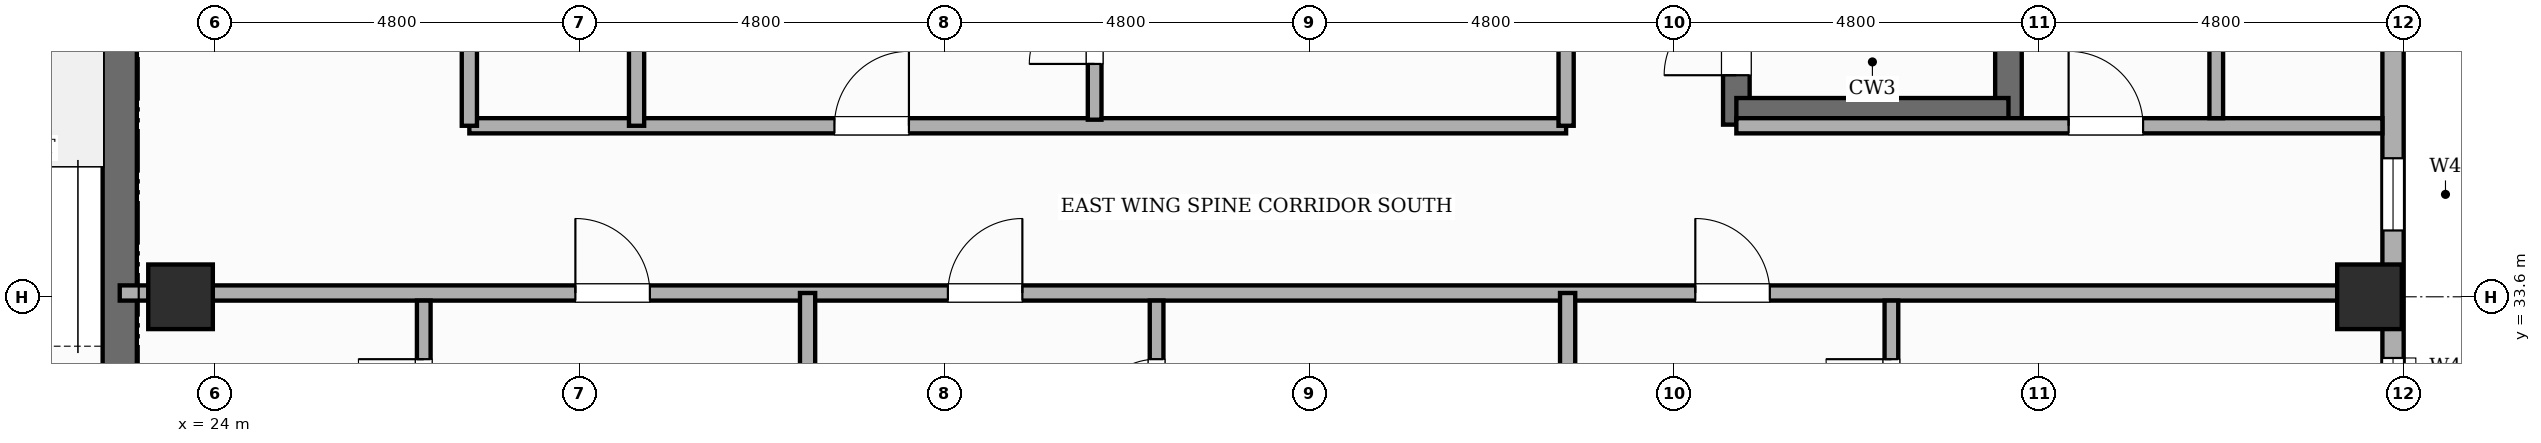
"""IFC4 building model, lengths in metres.
Left out: names, types, materials, properties, quantities, classifications, styles, units other than length and angle.
Written with IfcOpenShell. Run it as: python <this file> out.ifc"""

import sys

from ifc_helpers import new_model, si_unit, direction, frame, frame_2d, origin, origin_2d, place, context, subcontext, project, spatial, rectangle, extrude, element, fill, save


model = new_model("IFC4")
c1 = context("Model", 3, precision=1e-05, world=origin(), true_north=direction((0.0, 1.0)))
c2 = subcontext(c1, "Body", "Model", "MODEL_VIEW")
j1 = project(units=[si_unit("LENGTHUNIT", "METRE"), si_unit("PLANEANGLEUNIT", "RADIAN")], contexts=[c1])
p1 = place(None, origin())
s1 = spatial("IfcSite", under=j1, at=p1, CompositionType="ELEMENT")
p2 = place(p1, origin())
s2 = spatial("IfcBuilding", under=s1, at=p2, CompositionType="ELEMENT")
p3 = place(p2, frame((0.0, 0.0, 211.0)))
s3 = spatial("IfcBuildingStorey", under=s2, at=p3, CompositionType="ELEMENT", Elevation=211.0)
p4 = place(p3, frame((22.75, 30.675, 0.0), z_axis=(0.0, 0.0, 1.0), x_axis=(0.0, 1.0, 0.0)))
e1 = element("IfcWall", 1, at=p4, inside=s3, PredefinedType="SHEAR", context=c2, shape_type="SweptSolid", body=[
    extrude(rectangle(XDim=15.35, YDim=0.45, at=frame_2d((7.675, 0.0))), origin(), (0.0, 0.0, 1.0), 3.6),
])
p5 = place(p4, frame((10.675, 0.0, 0.0)))
e2 = element("IfcOpeningElement", 2, at=p5, cuts=e1, PredefinedType="OPENING", context=c2, shape_type="SweptSolid", body=[
    extrude(rectangle(XDim=1.0, YDim=2.15, at=frame_2d((0.5, 1.075))), frame((0.0, 0.235, 0.0), z_axis=(0.0, -1.0, 0.0), x_axis=(1.0, 0.0, 0.0)), (0.0, 0.0, 1.0), 0.47),
])
p6 = place(p3, frame((44.02, 35.865, 0.0), z_axis=(0.0, 0.0, 1.0), x_axis=(0.0, 1.0, 0.0)))
e3 = element("IfcWall", 3, at=p6, inside=s3, PredefinedType="SHEAR", context=c2, shape_type="SweptSolid", body=[
    extrude(rectangle(XDim=8.97, YDim=0.35, at=frame_2d((4.485, 0.0))), origin(), (0.0, 0.0, 1.0), 3.6),
])
p7 = place(p6, frame((0.65, 0.0, 0.0)))
e4 = element("IfcOpeningElement", 4, at=p7, cuts=e3, PredefinedType="OPENING", context=c2, shape_type="SweptSolid", body=[
    extrude(rectangle(XDim=0.95, YDim=2.1, at=frame_2d((0.475, 1.05))), frame((0.0, 0.185, 0.0), z_axis=(0.0, -1.0, 0.0), x_axis=(1.0, 0.0, 0.0)), (0.0, 0.0, 1.0), 0.37),
])
p8 = place(p3, frame((47.6, 35.865, 0.0), z_axis=(0.0, 0.0, 1.0), x_axis=(0.0, 1.0, 0.0)))
e5 = element("IfcWall", 5, at=p8, inside=s3, PredefinedType="SHEAR", context=c2, shape_type="SweptSolid", body=[
    extrude(rectangle(XDim=8.97, YDim=0.35, at=frame_2d((4.485, 0.0))), origin(), (0.0, 0.0, 1.0), 3.6),
])
p9 = place(p3, frame((44.02, 36.04, 0.0), z_axis=(0.0, 0.0, 1.0), x_axis=(1.0, 0.0, 0.0)))
e6 = element("IfcWall", 6, at=p9, inside=s3, PredefinedType="SHEAR", context=c2, shape_type="SweptSolid", body=[
    extrude(rectangle(XDim=3.58, YDim=0.35, at=frame_2d((1.79, 0.0))), origin(), (0.0, 0.0, 1.0), 3.6),
])
for number, where, z_axis, x_axis in (
    (7, (23.55, 33.6, 0.0), (0.0, 0.0, 1.0), (1.0, 0.0, 0.0)),
    (8, (52.35, 33.6, 0.0), (0.0, 0.0, 1.0), (1.0, 0.0, 0.0)),
):
    element("IfcColumn", number, at=place(p3, frame(where, z_axis=z_axis, x_axis=x_axis)), inside=s3, PredefinedType="COLUMN", context=c2, shape_type="SweptSolid", body=[
        extrude(rectangle(XDim=0.85, YDim=0.85, at=origin_2d()), origin(), (0.0, 0.0, 1.0), 3.6),
    ])
p10 = place(p3, frame((52.66, 45.6, 0.0), z_axis=(0.0, 0.0, 1.0), x_axis=(0.0, -1.0, 0.0)))
e9 = element("IfcWall", 9, at=p10, inside=s3, PredefinedType="STANDARD", context=c2, shape_type="SweptSolid", body=[
    extrude(rectangle(XDim=14.4, YDim=0.28, at=frame_2d((7.2, 0.0))), origin(), (0.0, 0.0, 1.0), 2.66),
])
p11 = place(p10, frame((4.25, 0.0, 0.0)))
e10 = element("IfcOpeningElement", 10, at=p11, cuts=e9, PredefinedType="OPENING", context=c2, shape_type="SweptSolid", body=[
    extrude(rectangle(XDim=1.1, YDim=2.15, at=frame_2d((0.55, 1.075))), frame((0.0, 0.15, 0.0), z_axis=(0.0, -1.0, 0.0), x_axis=(1.0, 0.0, 0.0)), (0.0, 0.0, 1.0), 0.3),
])
p12 = place(p10, frame((10.177, 0.0, 0.45)))
e11 = element("IfcOpeningElement", 11, at=p12, cuts=e9, PredefinedType="OPENING", context=c2, shape_type="SweptSolid", body=[
    extrude(rectangle(XDim=0.95, YDim=1.8, at=frame_2d((0.475, 0.9))), frame((0.0, 0.15, 0.0), z_axis=(0.0, -1.0, 0.0), x_axis=(1.0, 0.0, 0.0)), (0.0, 0.0, 1.0), 0.3),
])
p13 = place(p10, frame((12.805, 0.0, 0.45)))
e12 = element("IfcOpeningElement", 12, at=p13, cuts=e9, PredefinedType="OPENING", context=c2, shape_type="SweptSolid", body=[
    extrude(rectangle(XDim=0.95, YDim=1.8, at=frame_2d((0.475, 0.9))), frame((0.0, 0.15, 0.0), z_axis=(0.0, -1.0, 0.0), x_axis=(1.0, 0.0, 0.0)), (0.0, 0.0, 1.0), 0.3),
])
p14 = place(p10, frame((0.308, 0.0, 0.65)))
e13 = element("IfcOpeningElement", 13, at=p14, cuts=e9, PredefinedType="OPENING", context=c2, shape_type="SweptSolid", body=[
    extrude(rectangle(XDim=1.4, YDim=1.1, at=frame_2d((0.7, 0.55))), frame((0.0, 0.15, 0.0), z_axis=(0.0, -1.0, 0.0), x_axis=(1.0, 0.0, 0.0)), (0.0, 0.0, 1.0), 0.3),
])
p15 = place(p10, frame((3.299, 0.0, 0.45)))
e14 = element("IfcOpeningElement", 14, at=p15, cuts=e9, PredefinedType="OPENING", context=c2, shape_type="SweptSolid", body=[
    extrude(rectangle(XDim=0.6, YDim=1.8, at=frame_2d((0.3, 0.9))), frame((0.0, 0.15, 0.0), z_axis=(0.0, -1.0, 0.0), x_axis=(1.0, 0.0, 0.0)), (0.0, 0.0, 1.0), 0.3),
])
p16 = place(p3, frame((22.75, 33.65, 0.0), z_axis=(0.0, 0.0, 1.0), x_axis=(1.0, 0.0, 0.0)))
e15 = element("IfcWall", 15, at=p16, inside=s3, PredefinedType="PARTITIONING", context=c2, shape_type="SweptSolid", body=[
    extrude(rectangle(XDim=29.77, YDim=0.2, at=frame_2d((14.885, 0.0))), origin(), (0.0, 0.0, 1.0), 3.38),
])
p17 = place(p16, frame((5.995, 0.0, 0.0)))
e16 = element("IfcOpeningElement", 16, at=p17, cuts=e15, PredefinedType="OPENING", context=c2, shape_type="SweptSolid", body=[
    extrude(rectangle(XDim=0.98, YDim=2.18, at=frame_2d((0.49, 1.09))), frame((0.0, 0.11, 0.0), z_axis=(0.0, -1.0, 0.0), x_axis=(1.0, 0.0, 0.0)), (0.0, 0.0, 1.0), 0.22),
])
p18 = place(p16, frame((10.896, 0.0, 0.0)))
e17 = element("IfcOpeningElement", 17, at=p18, cuts=e15, PredefinedType="OPENING", context=c2, shape_type="SweptSolid", body=[
    extrude(rectangle(XDim=0.98, YDim=2.18, at=frame_2d((0.49, 1.09))), frame((0.0, 0.11, 0.0), z_axis=(0.0, -1.0, 0.0), x_axis=(1.0, 0.0, 0.0)), (0.0, 0.0, 1.0), 0.22),
])
p19 = place(p16, frame((20.73, 0.0, 0.0)))
e18 = element("IfcOpeningElement", 18, at=p19, cuts=e15, PredefinedType="OPENING", context=c2, shape_type="SweptSolid", body=[
    extrude(rectangle(XDim=0.98, YDim=2.18, at=frame_2d((0.49, 1.09))), frame((0.0, 0.11, 0.0), z_axis=(0.0, -1.0, 0.0), x_axis=(1.0, 0.0, 0.0)), (0.0, 0.0, 1.0), 0.22),
])
p20 = place(p3, frame((27.35, 35.85, 0.0), z_axis=(0.0, 0.0, 1.0), x_axis=(1.0, 0.0, 0.0)))
e19 = element("IfcWall", 19, at=p20, inside=s3, PredefinedType="PARTITIONING", context=c2, shape_type="SweptSolid", body=[
    extrude(rectangle(XDim=14.43, YDim=0.2, at=frame_2d((7.215, 0.0))), origin(), (0.0, 0.0, 1.0), 3.38),
])
p21 = place(p20, frame((4.803, 0.0, 0.0)))
e20 = element("IfcOpeningElement", 20, at=p21, cuts=e19, PredefinedType="OPENING", context=c2, shape_type="SweptSolid", body=[
    extrude(rectangle(XDim=0.98, YDim=2.18, at=frame_2d((0.49, 1.09))), frame((0.0, 0.11, 0.0), z_axis=(0.0, -1.0, 0.0), x_axis=(1.0, 0.0, 0.0)), (0.0, 0.0, 1.0), 0.22),
])
p22 = place(p3, frame((44.02, 35.85, 0.0), z_axis=(0.0, 0.0, 1.0), x_axis=(1.0, 0.0, 0.0)))
e21 = element("IfcWall", 21, at=p22, inside=s3, PredefinedType="PARTITIONING", context=c2, shape_type="SweptSolid", body=[
    extrude(rectangle(XDim=8.5, YDim=0.2, at=frame_2d((4.25, 0.0))), origin(), (0.0, 0.0, 1.0), 3.38),
])
p23 = place(p22, frame((4.372, 0.0, 0.0)))
e22 = element("IfcOpeningElement", 22, at=p23, cuts=e21, PredefinedType="OPENING", context=c2, shape_type="SweptSolid", body=[
    extrude(rectangle(XDim=0.98, YDim=2.18, at=frame_2d((0.49, 1.09))), frame((0.0, 0.11, 0.0), z_axis=(0.0, -1.0, 0.0), x_axis=(1.0, 0.0, 0.0)), (0.0, 0.0, 1.0), 0.22),
])
p24 = place(p3, frame((27.35, 35.85, 0.0), z_axis=(0.0, 0.0, 1.0), x_axis=(0.0, 1.0, 0.0)))
e23 = element("IfcWall", 23, at=p24, inside=s3, PredefinedType="PARTITIONING", context=c2, shape_type="SweptSolid", body=[
    extrude(rectangle(XDim=11.87, YDim=0.2, at=frame_2d((5.935, 0.0))), origin(), (0.0, 0.0, 1.0), 3.38),
])
p25 = place(p24, frame((1.2, 0.0, 0.0)))
e24 = element("IfcOpeningElement", 24, at=p25, cuts=e23, PredefinedType="OPENING", context=c2, shape_type="SweptSolid", body=[
    extrude(rectangle(XDim=0.95, YDim=2.15, at=frame_2d((0.475, 1.075))), frame((0.0, 0.11, 0.0), z_axis=(0.0, -1.0, 0.0), x_axis=(1.0, 0.0, 0.0)), (0.0, 0.0, 1.0), 0.22),
])
p26 = place(p3, frame((41.78, 35.85, 0.0), z_axis=(0.0, 0.0, 1.0), x_axis=(0.0, 1.0, 0.0)))
e25 = element("IfcWall", 25, at=p26, inside=s3, PredefinedType="PARTITIONING", context=c2, shape_type="SweptSolid", body=[
    extrude(rectangle(XDim=2.45, YDim=0.2, at=frame_2d((1.225, 0.0))), origin(), (0.0, 0.0, 1.0), 3.38),
])
p27 = place(p3, frame((26.75, 29.08, 0.0), z_axis=(0.0, 0.0, 1.0), x_axis=(0.0, 1.0, 0.0)))
e26 = element("IfcWall", 26, at=p27, inside=s3, PredefinedType="PLUMBINGWALL", context=c2, shape_type="SweptSolid", body=[
    extrude(rectangle(XDim=4.47, YDim=0.18, at=frame_2d((2.235, 0.0))), origin(), (0.0, 0.0, 1.0), 3.38),
])
p28 = place(p27, frame((0.499, 0.0, 0.0)))
e27 = element("IfcOpeningElement", 27, at=p28, cuts=e26, PredefinedType="OPENING", context=c2, shape_type="SweptSolid", body=[
    extrude(rectangle(XDim=0.86, YDim=2.1, at=frame_2d((0.43, 1.05))), frame((0.0, 0.1, 0.0), z_axis=(0.0, -1.0, 0.0), x_axis=(1.0, 0.0, 0.0)), (0.0, 0.0, 1.0), 0.2),
])
p29 = place(p27, frame((2.839, 0.0, 0.0)))
e28 = element("IfcOpeningElement", 28, at=p29, cuts=e26, PredefinedType="OPENING", context=c2, shape_type="SweptSolid", body=[
    extrude(rectangle(XDim=0.86, YDim=2.1, at=frame_2d((0.43, 1.05))), frame((0.0, 0.1, 0.0), z_axis=(0.0, -1.0, 0.0), x_axis=(1.0, 0.0, 0.0)), (0.0, 0.0, 1.0), 0.2),
])
p30 = place(p3, frame((31.8, 29.08, 0.0), z_axis=(0.0, 0.0, 1.0), x_axis=(0.0, 1.0, 0.0)))
e29 = element("IfcWall", 29, at=p30, inside=s3, PredefinedType="SOLIDWALL", context=c2, shape_type="SweptSolid", body=[
    extrude(rectangle(XDim=4.57, YDim=0.2, at=frame_2d((2.285, 0.0))), origin(), (0.0, 0.0, 1.0), 3.38),
])
p31 = place(p3, frame((36.392, 29.08, 0.0), z_axis=(0.0, 0.0, 1.0), x_axis=(0.0, 1.0, 0.0)))
e30 = element("IfcWall", 30, at=p31, inside=s3, PredefinedType="PLUMBINGWALL", context=c2, shape_type="SweptSolid", body=[
    extrude(rectangle(XDim=4.47, YDim=0.18, at=frame_2d((2.235, 0.0))), origin(), (0.0, 0.0, 1.0), 3.38),
])
p32 = place(p31, frame((0.499, 0.0, 0.0)))
e31 = element("IfcOpeningElement", 31, at=p32, cuts=e30, PredefinedType="OPENING", context=c2, shape_type="SweptSolid", body=[
    extrude(rectangle(XDim=0.86, YDim=2.1, at=frame_2d((0.43, 1.05))), frame((0.0, 0.1, 0.0), z_axis=(0.0, -1.0, 0.0), x_axis=(1.0, 0.0, 0.0)), (0.0, 0.0, 1.0), 0.2),
])
p33 = place(p31, frame((2.839, 0.0, 0.0)))
e32 = element("IfcOpeningElement", 32, at=p33, cuts=e30, PredefinedType="OPENING", context=c2, shape_type="SweptSolid", body=[
    extrude(rectangle(XDim=0.86, YDim=2.1, at=frame_2d((0.43, 1.05))), frame((0.0, 0.1, 0.0), z_axis=(0.0, -1.0, 0.0), x_axis=(1.0, 0.0, 0.0)), (0.0, 0.0, 1.0), 0.2),
])
p34 = place(p3, frame((41.8, 29.08, 0.0), z_axis=(0.0, 0.0, 1.0), x_axis=(0.0, 1.0, 0.0)))
e33 = element("IfcWall", 33, at=p34, inside=s3, PredefinedType="SOLIDWALL", context=c2, shape_type="SweptSolid", body=[
    extrude(rectangle(XDim=4.57, YDim=0.2, at=frame_2d((2.285, 0.0))), origin(), (0.0, 0.0, 1.0), 3.38),
])
p35 = place(p3, frame((46.06, 29.08, 0.0), z_axis=(0.0, 0.0, 1.0), x_axis=(0.0, 1.0, 0.0)))
e34 = element("IfcWall", 34, at=p35, inside=s3, PredefinedType="PLUMBINGWALL", context=c2, shape_type="SweptSolid", body=[
    extrude(rectangle(XDim=4.47, YDim=0.18, at=frame_2d((2.235, 0.0))), origin(), (0.0, 0.0, 1.0), 3.38),
])
p36 = place(p35, frame((0.499, 0.0, 0.0)))
e35 = element("IfcOpeningElement", 35, at=p36, cuts=e34, PredefinedType="OPENING", context=c2, shape_type="SweptSolid", body=[
    extrude(rectangle(XDim=0.86, YDim=2.1, at=frame_2d((0.43, 1.05))), frame((0.0, 0.1, 0.0), z_axis=(0.0, -1.0, 0.0), x_axis=(1.0, 0.0, 0.0)), (0.0, 0.0, 1.0), 0.2),
])
p37 = place(p35, frame((2.839, 0.0, 0.0)))
e36 = element("IfcOpeningElement", 36, at=p37, cuts=e34, PredefinedType="OPENING", context=c2, shape_type="SweptSolid", body=[
    extrude(rectangle(XDim=0.86, YDim=2.1, at=frame_2d((0.43, 1.05))), frame((0.0, 0.1, 0.0), z_axis=(0.0, -1.0, 0.0), x_axis=(1.0, 0.0, 0.0)), (0.0, 0.0, 1.0), 0.2),
])
p38 = place(p3, frame((29.55, 35.85, 0.0), z_axis=(0.0, 0.0, 1.0), x_axis=(0.0, 1.0, 0.0)))
e37 = element("IfcWall", 37, at=p38, inside=s3, PredefinedType="SOLIDWALL", context=c2, shape_type="SweptSolid", body=[
    extrude(rectangle(XDim=11.87, YDim=0.2, at=frame_2d((5.935, 0.0))), origin(), (0.0, 0.0, 1.0), 3.38),
])
p39 = place(p3, frame((35.577, 35.93, 0.0), z_axis=(0.0, 0.0, 1.0), x_axis=(0.0, 1.0, 0.0)))
e38 = element("IfcWall", 38, at=p39, inside=s3, PredefinedType="PLUMBINGWALL", context=c2, shape_type="SweptSolid", body=[
    extrude(rectangle(XDim=11.79, YDim=0.18, at=frame_2d((5.895, 0.0))), origin(), (0.0, 0.0, 1.0), 3.38),
])
p40 = place(p39, frame((0.733, 0.0, 0.0)))
e39 = element("IfcOpeningElement", 39, at=p40, cuts=e38, PredefinedType="OPENING", context=c2, shape_type="SweptSolid", body=[
    extrude(rectangle(XDim=0.86, YDim=2.1, at=frame_2d((0.43, 1.05))), frame((0.0, 0.1, 0.0), z_axis=(0.0, -1.0, 0.0), x_axis=(1.0, 0.0, 0.0)), (0.0, 0.0, 1.0), 0.2),
])
p41 = place(p39, frame((4.064, 0.0, 0.0)))
e40 = element("IfcOpeningElement", 40, at=p41, cuts=e38, PredefinedType="OPENING", context=c2, shape_type="SweptSolid", body=[
    extrude(rectangle(XDim=0.9, YDim=2.15, at=frame_2d((0.45, 1.075))), frame((0.0, 0.1, 0.0), z_axis=(0.0, -1.0, 0.0), x_axis=(1.0, 0.0, 0.0)), (0.0, 0.0, 1.0), 0.2),
])
p42 = place(p39, frame((8.789, 0.0, 0.0)))
e41 = element("IfcOpeningElement", 41, at=p42, cuts=e38, PredefinedType="OPENING", context=c2, shape_type="SweptSolid", body=[
    extrude(rectangle(XDim=0.9, YDim=2.15, at=frame_2d((0.45, 1.075))), frame((0.0, 0.1, 0.0), z_axis=(0.0, -1.0, 0.0), x_axis=(1.0, 0.0, 0.0)), (0.0, 0.0, 1.0), 0.2),
])
p43 = place(p3, frame((50.334, 35.95, 0.0), z_axis=(0.0, 0.0, 1.0), x_axis=(0.0, 1.0, 0.0)))
e42 = element("IfcWall", 42, at=p43, inside=s3, PredefinedType="PLUMBINGWALL", context=c2, shape_type="SweptSolid", body=[
    extrude(rectangle(XDim=11.77, YDim=0.18, at=frame_2d((5.885, 0.0))), origin(), (0.0, 0.0, 1.0), 3.38),
])
p44 = place(p43, frame((2.453, 0.0, 0.0)))
e43 = element("IfcOpeningElement", 43, at=p44, cuts=e42, PredefinedType="OPENING", context=c2, shape_type="SweptSolid", body=[
    extrude(rectangle(XDim=0.9, YDim=2.15, at=frame_2d((0.45, 1.075))), frame((0.0, 0.1, 0.0), z_axis=(0.0, -1.0, 0.0), x_axis=(1.0, 0.0, 0.0)), (0.0, 0.0, 1.0), 0.2),
])
p45 = place(p43, frame((8.487, 0.0, 0.0)))
e44 = element("IfcOpeningElement", 44, at=p45, cuts=e42, PredefinedType="OPENING", context=c2, shape_type="SweptSolid", body=[
    extrude(rectangle(XDim=0.86, YDim=2.1, at=frame_2d((0.43, 1.05))), frame((0.0, 0.1, 0.0), z_axis=(0.0, -1.0, 0.0), x_axis=(1.0, 0.0, 0.0)), (0.0, 0.0, 1.0), 0.2),
])
p46 = place(p12, origin())
e45 = element("IfcWindow", 45, at=p46, inside=s3, PartitioningType="SINGLE_PANEL", PredefinedType="WINDOW", context=c2, shape_type="SweptSolid", body=[
    extrude(rectangle(XDim=0.95, YDim=1.8, at=frame_2d((0.475, 0.9))), frame((0.0, 0.03, 0.0), z_axis=(0.0, -1.0, 0.0), x_axis=(1.0, 0.0, 0.0)), (0.0, 0.0, 1.0), 0.06),
])
fill(e11, e45)
p47 = place(p13, origin())
e46 = element("IfcWindow", 46, at=p47, inside=s3, PartitioningType="SINGLE_PANEL", PredefinedType="WINDOW", context=c2, shape_type="SweptSolid", body=[
    extrude(rectangle(XDim=0.95, YDim=1.8, at=frame_2d((0.475, 0.9))), frame((0.0, 0.03, 0.0), z_axis=(0.0, -1.0, 0.0), x_axis=(1.0, 0.0, 0.0)), (0.0, 0.0, 1.0), 0.06),
])
fill(e12, e46)
p48 = place(p7, origin())
e47 = element("IfcDoor", 47, at=p48, inside=s3, OperationType="SINGLE_SWING_LEFT", PredefinedType="DOOR", context=c2, shape_type="SweptSolid", body=[
    extrude(rectangle(XDim=0.95, YDim=2.1, at=frame_2d((0.475, 1.05))), frame((0.0, 0.025, 0.0), z_axis=(0.0, -1.0, 0.0), x_axis=(1.0, 0.0, 0.0)), (0.0, 0.0, 1.0), 0.05),
])
fill(e4, e47)
p49 = place(p17, origin())
e48 = element("IfcDoor", 48, at=p49, inside=s3, OperationType="SINGLE_SWING_LEFT", PredefinedType="DOOR", context=c2, shape_type="SweptSolid", body=[
    extrude(rectangle(XDim=0.98, YDim=2.18, at=frame_2d((0.49, 1.09))), frame((0.0, 0.025, 0.0), z_axis=(0.0, -1.0, 0.0), x_axis=(1.0, 0.0, 0.0)), (0.0, 0.0, 1.0), 0.05),
])
fill(e16, e48)
p50 = place(p29, origin())
e49 = element("IfcDoor", 49, at=p50, inside=s3, OperationType="SINGLE_SWING_RIGHT", PredefinedType="DOOR", context=c2, shape_type="SweptSolid", body=[
    extrude(rectangle(XDim=0.86, YDim=2.1, at=frame_2d((0.43, 1.05))), frame((0.0, 0.025, 0.0), z_axis=(0.0, -1.0, 0.0), x_axis=(1.0, 0.0, 0.0)), (0.0, 0.0, 1.0), 0.05),
])
fill(e28, e49)
p51 = place(p18, origin())
e50 = element("IfcDoor", 50, at=p51, inside=s3, OperationType="SINGLE_SWING_RIGHT", PredefinedType="DOOR", context=c2, shape_type="SweptSolid", body=[
    extrude(rectangle(XDim=0.98, YDim=2.18, at=frame_2d((0.49, 1.09))), frame((0.0, 0.025, 0.0), z_axis=(0.0, -1.0, 0.0), x_axis=(1.0, 0.0, 0.0)), (0.0, 0.0, 1.0), 0.05),
])
fill(e17, e50)
p52 = place(p33, origin())
e51 = element("IfcDoor", 51, at=p52, inside=s3, OperationType="SINGLE_SWING_LEFT", PredefinedType="DOOR", context=c2, shape_type="SweptSolid", body=[
    extrude(rectangle(XDim=0.86, YDim=2.1, at=frame_2d((0.43, 1.05))), frame((0.0, 0.025, 0.0), z_axis=(0.0, -1.0, 0.0), x_axis=(1.0, 0.0, 0.0)), (0.0, 0.0, 1.0), 0.05),
])
fill(e32, e51)
p53 = place(p19, origin())
e52 = element("IfcDoor", 52, at=p53, inside=s3, OperationType="SINGLE_SWING_LEFT", PredefinedType="DOOR", context=c2, shape_type="SweptSolid", body=[
    extrude(rectangle(XDim=0.98, YDim=2.18, at=frame_2d((0.49, 1.09))), frame((0.0, 0.025, 0.0), z_axis=(0.0, -1.0, 0.0), x_axis=(1.0, 0.0, 0.0)), (0.0, 0.0, 1.0), 0.05),
])
fill(e18, e52)
p54 = place(p37, origin())
e53 = element("IfcDoor", 53, at=p54, inside=s3, OperationType="SINGLE_SWING_RIGHT", PredefinedType="DOOR", context=c2, shape_type="SweptSolid", body=[
    extrude(rectangle(XDim=0.86, YDim=2.1, at=frame_2d((0.43, 1.05))), frame((0.0, 0.025, 0.0), z_axis=(0.0, -1.0, 0.0), x_axis=(1.0, 0.0, 0.0)), (0.0, 0.0, 1.0), 0.05),
])
fill(e36, e53)
p55 = place(p21, origin())
e54 = element("IfcDoor", 54, at=p55, inside=s3, OperationType="SINGLE_SWING_RIGHT", PredefinedType="DOOR", context=c2, shape_type="SweptSolid", body=[
    extrude(rectangle(XDim=0.98, YDim=2.18, at=frame_2d((0.49, 1.09))), frame((0.0, 0.025, 0.0), z_axis=(0.0, -1.0, 0.0), x_axis=(1.0, 0.0, 0.0)), (0.0, 0.0, 1.0), 0.05),
])
fill(e20, e54)
p56 = place(p40, origin())
e55 = element("IfcDoor", 55, at=p56, inside=s3, OperationType="SINGLE_SWING_LEFT", PredefinedType="DOOR", context=c2, shape_type="SweptSolid", body=[
    extrude(rectangle(XDim=0.86, YDim=2.1, at=frame_2d((0.43, 1.05))), frame((0.0, 0.025, 0.0), z_axis=(0.0, -1.0, 0.0), x_axis=(1.0, 0.0, 0.0)), (0.0, 0.0, 1.0), 0.05),
])
fill(e39, e55)
p57 = place(p23, origin())
e56 = element("IfcDoor", 56, at=p57, inside=s3, OperationType="SINGLE_SWING_LEFT", PredefinedType="DOOR", context=c2, shape_type="SweptSolid", body=[
    extrude(rectangle(XDim=0.98, YDim=2.18, at=frame_2d((0.49, 1.09))), frame((0.0, 0.025, 0.0), z_axis=(0.0, -1.0, 0.0), x_axis=(1.0, 0.0, 0.0)), (0.0, 0.0, 1.0), 0.05),
])
fill(e22, e56)
save(model, sys.argv[1])
